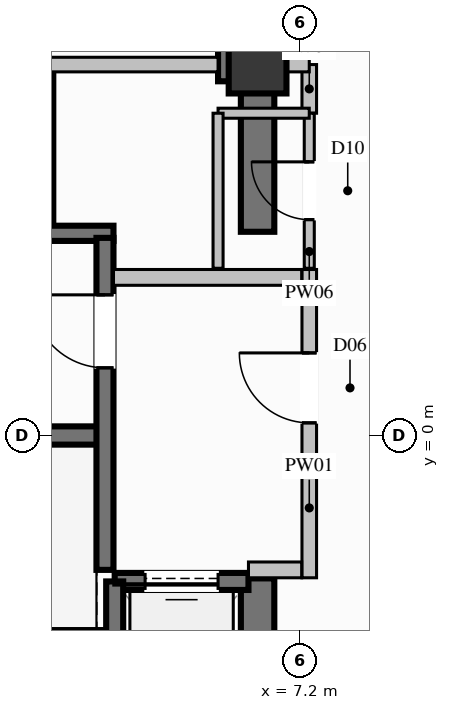
"""IFC4 building model, lengths in metres.
Left out: names, types, materials, properties, quantities, classifications, styles, units other than length and angle.
Written with IfcOpenShell. Run it as: python <this file> out.ifc"""

import sys

from ifc_helpers import new_model, si_unit, direction, frame, frame_2d, origin, origin_2d, place, context, subcontext, project, spatial, rectangle, extrude, element, fill, save


model = new_model("IFC4")
c1 = context("Model", 3, precision=1e-05, world=origin(), true_north=direction((0.0, 1.0)))
c2 = subcontext(c1, "Body", "Model", "MODEL_VIEW")
j1 = project(units=[si_unit("LENGTHUNIT", "METRE"), si_unit("PLANEANGLEUNIT", "RADIAN")], contexts=[c1])
p1 = place(None, origin())
s1 = spatial("IfcSite", under=j1, at=p1, CompositionType="ELEMENT")
p2 = place(p1, origin())
s2 = spatial("IfcBuilding", under=s1, at=p2, CompositionType="ELEMENT")
p3 = place(p2, frame((0.0, 0.0, 168.6)))
s3 = spatial("IfcBuildingStorey", under=s2, at=p3, CompositionType="ELEMENT", Elevation=168.6)
p4 = place(p3, frame((6.5, 6.1, 0.0), z_axis=(0.0, 0.0, 1.0), x_axis=(1.0, 0.0, 0.0)))
e1 = element("IfcColumn", 1, at=p4, inside=s3, PredefinedType="COLUMN", context=c2, shape_type="SweptSolid", body=[
    extrude(rectangle(XDim=0.95, YDim=0.95, at=origin_2d()), origin(), (0.0, 0.0, 1.0), 4.6),
])
p5 = place(p3, frame((-3.99, 0.0, 0.0), z_axis=(0.0, 0.0, 1.0), x_axis=(1.0, 0.0, 0.0)))
e2 = element("IfcWall", 2, at=p5, inside=s3, PredefinedType="SHEAR", context=c2, shape_type="SweptSolid", body=[
    extrude(rectangle(XDim=7.98, YDim=0.3, at=frame_2d((3.99, 0.0))), origin(), (0.0, 0.0, 1.0), 4.6),
])
for number, where, z_axis, x_axis in (
    (3, (-4.13, -3.325, 0.0), (0.0, 0.0, 1.0), (1.0, 0.0, 0.0)),
    (4, (-4.13, 3.325, 0.0), (0.0, 0.0, 1.0), (1.0, 0.0, 0.0)),
):
    element("IfcWall", number, at=place(p3, frame(where, z_axis=z_axis, x_axis=x_axis)), inside=s3, PredefinedType="SOLIDWALL", context=c2, shape_type="SweptSolid", body=[
        extrude(rectangle(XDim=8.26, YDim=0.25, at=frame_2d((4.13, 0.0))), origin(), (0.0, 0.0, 1.0), 4.6),
    ])
p6 = place(p3, frame((5.85, 6.1, 0.0), z_axis=(0.0, 0.0, 1.0), x_axis=(1.0, 0.0, 0.0)))
e5 = element("IfcWall", 5, at=p6, inside=s3, PredefinedType="SHEAR", context=c2, shape_type="SweptSolid", body=[
    extrude(rectangle(XDim=0.375, YDim=0.55, at=frame_2d((0.188, 0.0))), origin(), (0.0, 0.0, 1.0), 4.6),
])
p7 = place(p3, frame((6.5, -6.375, 0.0), z_axis=(0.0, 0.0, 1.0), x_axis=(0.0, 1.0, 0.0)))
e6 = element("IfcWall", 6, at=p7, inside=s3, PredefinedType="SHEAR", context=c2, shape_type="SweptSolid", body=[
    extrude(rectangle(XDim=4.025, YDim=0.55, at=frame_2d((2.012, 0.0))), origin(), (0.0, 0.0, 1.0), 4.6),
])
p8 = place(p3, frame((6.5, 3.35, 0.0), z_axis=(0.0, 0.0, 1.0), x_axis=(0.0, 1.0, 0.0)))
e7 = element("IfcWall", 7, at=p8, inside=s3, PredefinedType="SHEAR", context=c2, shape_type="SweptSolid", body=[
    extrude(rectangle(XDim=3.025, YDim=0.55, at=frame_2d((1.512, 0.0))), origin(), (0.0, 0.0, 1.0), 4.6),
])
p9 = place(p3, frame((3.0, 3.5, 0.0), z_axis=(0.0, 0.0, 1.0), x_axis=(0.0, 1.0, 0.0)))
e8 = element("IfcWall", 8, at=p9, inside=s3, PredefinedType="SOLIDWALL", context=c2, shape_type="SweptSolid", body=[
    extrude(rectangle(XDim=2.5, YDim=0.28, at=frame_2d((1.25, 0.0))), origin(), (0.0, 0.0, 1.0), 4.36),
])
p10 = place(p3, frame((6.35, -2.4, 0.0), z_axis=(0.0, 0.0, 1.0), x_axis=(-1.0, 0.0, 0.0)))
e9 = element("IfcWall", 9, at=p10, inside=s3, PredefinedType="SOLIDWALL", context=c2, shape_type="SweptSolid", body=[
    extrude(rectangle(XDim=2.2, YDim=0.28, at=frame_2d((1.1, 0.0))), origin(), (0.0, 0.0, 1.0), 4.36),
])
p11 = place(p10, frame((0.5, 0.0, 0.0)))
e10 = element("IfcOpeningElement", 10, at=p11, cuts=e9, PredefinedType="OPENING", context=c2, shape_type="SweptSolid", body=[
    extrude(rectangle(XDim=1.2, YDim=2.2, at=frame_2d((0.6, 1.1))), frame((0.0, 0.15, 0.0), z_axis=(0.0, -1.0, 0.0), x_axis=(1.0, 0.0, 0.0)), (0.0, 0.0, 1.0), 0.3),
])
p12 = place(p3, frame((4.15, -2.4, 0.0), z_axis=(0.0, 0.0, 1.0), x_axis=(0.0, -1.0, 0.0)))
e11 = element("IfcWall", 11, at=p12, inside=s3, PredefinedType="SOLIDWALL", context=c2, shape_type="SweptSolid", body=[
    extrude(rectangle(XDim=2.7, YDim=0.28, at=frame_2d((1.35, 0.0))), origin(), (0.0, 0.0, 1.0), 4.36),
])
p13 = place(p3, frame((3.99, -2.21, 0.0), z_axis=(0.0, 0.0, 1.0), x_axis=(0.0, 1.0, 0.0)))
e12 = element("IfcWall", 12, at=p13, inside=s3, PredefinedType="SOLIDWALL", context=c2, shape_type="SweptSolid", body=[
    extrude(rectangle(XDim=5.46, YDim=0.28, at=frame_2d((2.73, 0.0))), origin(), (0.0, 0.0, 1.0), 4.36),
])
p14 = place(p13, frame((3.323, 0.0, 0.0)))
e13 = element("IfcOpeningElement", 13, at=p14, cuts=e12, PredefinedType="OPENING", context=c2, shape_type="SweptSolid", body=[
    extrude(rectangle(XDim=1.2, YDim=2.2, at=frame_2d((0.6, 1.1))), frame((0.0, 0.15, 0.0), z_axis=(0.0, -1.0, 0.0), x_axis=(1.0, 0.0, 0.0)), (0.0, 0.0, 1.0), 0.3),
])
p15 = place(p3, frame((7.35, -2.34, 0.0), z_axis=(0.0, 0.0, 1.0), x_axis=(0.0, 1.0, 0.0)))
e14 = element("IfcWall", 14, at=p15, inside=s3, PredefinedType="PARTITIONING", context=c2, shape_type="SweptSolid", body=[
    extrude(rectangle(XDim=5.07, YDim=0.24, at=frame_2d((2.535, 0.0))), origin(), (0.0, 0.0, 1.0), 3.245),
])
p16 = place(p15, frame((2.548, 0.0, 0.0)))
e15 = element("IfcOpeningElement", 15, at=p16, cuts=e14, PredefinedType="OPENING", context=c2, shape_type="SweptSolid", body=[
    extrude(rectangle(XDim=1.15, YDim=2.2, at=frame_2d((0.575, 1.1))), frame((0.0, 0.13, 0.0), z_axis=(0.0, -1.0, 0.0), x_axis=(1.0, 0.0, 0.0)), (0.0, 0.0, 1.0), 0.26),
])
p17 = place(p3, frame((6.35, -2.21, 0.0), z_axis=(0.0, 0.0, 1.0), x_axis=(1.0, 0.0, 0.0)))
e16 = element("IfcWall", 16, at=p17, inside=s3, PredefinedType="PARTITIONING", context=c2, shape_type="SweptSolid", body=[
    extrude(rectangle(XDim=0.875, YDim=0.26, at=frame_2d((0.438, 0.0))), origin(), (0.0, 0.0, 1.0), 4.36),
])
p18 = place(p3, frame((4.13, 2.6, 0.0), z_axis=(0.0, 0.0, 1.0), x_axis=(1.0, 0.0, 0.0)))
e17 = element("IfcWall", 17, at=p18, inside=s3, PredefinedType="PARTITIONING", context=c2, shape_type="SweptSolid", body=[
    extrude(rectangle(XDim=3.095, YDim=0.26, at=frame_2d((1.548, 0.0))), origin(), (0.0, 0.0, 1.0), 4.36),
])
p19 = place(p3, frame((3.0, 6.1, 0.0), z_axis=(0.0, 0.0, 1.0), x_axis=(1.0, 0.0, 0.0)))
e18 = element("IfcWall", 18, at=p19, inside=s3, PredefinedType="PARTITIONING", context=c2, shape_type="SweptSolid", body=[
    extrude(rectangle(XDim=2.85, YDim=0.24, at=frame_2d((1.425, 0.0))), origin(), (0.0, 0.0, 1.0), 3.245),
])
p20 = place(p3, frame((7.35, 5.3, 0.0), z_axis=(0.0, 0.0, 1.0), x_axis=(0.0, 1.0, 0.0)))
e19 = element("IfcWall", 19, at=p20, inside=s3, PredefinedType="PARTITIONING", context=c2, shape_type="SweptSolid", body=[
    extrude(rectangle(XDim=0.8, YDim=0.24, at=frame_2d((0.4, 0.0))), origin(), (0.0, 0.0, 1.0), 3.245),
])
p21 = place(p3, frame((6.5, 6.1, 0.0), z_axis=(0.0, 0.0, 1.0), x_axis=(1.0, 0.0, 0.0)))
e20 = element("IfcWall", 20, at=p21, inside=s3, PredefinedType="PARTITIONING", context=c2, shape_type="SweptSolid", body=[
    extrude(rectangle(XDim=0.85, YDim=0.24, at=frame_2d((0.425, 0.0))), origin(), (0.0, 0.0, 1.0), 3.877),
])
p22 = place(p3, frame((7.35, 2.75, 0.0), z_axis=(0.0, 0.0, 1.0), x_axis=(0.0, 1.0, 0.0)))
e21 = element("IfcWall", 21, at=p22, inside=s3, PredefinedType="PARTITIONING", context=c2, shape_type="SweptSolid", body=[
    extrude(rectangle(XDim=2.55, YDim=0.165, at=frame_2d((1.275, 0.0))), origin(), (0.0, 0.0, 1.0), 3.245),
])
p23 = place(p22, frame((0.8, 0.0, 0.0)))
e22 = element("IfcOpeningElement", 22, at=p23, cuts=e21, PredefinedType="OPENING", context=c2, shape_type="SweptSolid", body=[
    extrude(rectangle(XDim=0.95, YDim=2.1, at=frame_2d((0.475, 1.05))), frame((0.0, 0.093, 0.0), z_axis=(0.0, -1.0, 0.0), x_axis=(1.0, 0.0, 0.0)), (0.0, 0.0, 1.0), 0.185),
])
p24 = place(p3, frame((7.35, 5.3, 0.0), z_axis=(0.0, 0.0, 1.0), x_axis=(-1.0, 0.0, 0.0)))
e23 = element("IfcWall", 23, at=p24, inside=s3, PredefinedType="PARTITIONING", context=c2, shape_type="SweptSolid", body=[
    extrude(rectangle(XDim=1.5, YDim=0.165, at=frame_2d((0.75, 0.0))), origin(), (0.0, 0.0, 1.0), 3.245),
])
p25 = place(p3, frame((5.85, 5.3, 0.0), z_axis=(0.0, 0.0, 1.0), x_axis=(0.0, -1.0, 0.0)))
e24 = element("IfcWall", 24, at=p25, inside=s3, PredefinedType="PARTITIONING", context=c2, shape_type="SweptSolid", body=[
    extrude(rectangle(XDim=2.55, YDim=0.165, at=frame_2d((1.275, 0.0))), origin(), (0.0, 0.0, 1.0), 3.245),
])
p26 = place(p3, frame((7.35, 8.65, 0.0), z_axis=(0.0, 0.0, 1.0), x_axis=(0.851645088617, -0.524118920699, 0.0)))
e25 = element("IfcWall", 25, at=p26, inside=s3, PredefinedType="PARTITIONING", context=c2, shape_type="SweptSolid", body=[
    extrude(rectangle(XDim=4.436, YDim=0.19, at=frame_2d((2.218, 0.0))), origin(), (0.0, 0.0, 1.0), 4.36),
])
p27 = place(p26, frame((1.318, 0.0, 0.0)))
e26 = element("IfcOpeningElement", 26, at=p27, cuts=e25, PredefinedType="OPENING", context=c2, shape_type="SweptSolid", body=[
    extrude(rectangle(XDim=1.8, YDim=2.4, at=frame_2d((0.9, 1.2))), frame((0.0, 0.105, 0.0), z_axis=(0.0, -1.0, 0.0), x_axis=(1.0, 0.0, 0.0)), (0.0, 0.0, 1.0), 0.21),
])
p28 = place(p11, origin())
e27 = element("IfcDoor", 27, at=p28, inside=s3, OperationType="SLIDING_TO_LEFT", PredefinedType="DOOR", context=c2, shape_type="SweptSolid", body=[
    extrude(rectangle(XDim=1.2, YDim=2.2, at=frame_2d((0.6, 1.1))), frame((0.0, 0.025, 0.0), z_axis=(0.0, -1.0, 0.0), x_axis=(1.0, 0.0, 0.0)), (0.0, 0.0, 1.0), 0.05),
])
fill(e10, e27)
p29 = place(p14, origin())
e28 = element("IfcDoor", 28, at=p29, inside=s3, OperationType="SINGLE_SWING_RIGHT", PredefinedType="DOOR", context=c2, shape_type="SweptSolid", body=[
    extrude(rectangle(XDim=1.2, YDim=2.2, at=frame_2d((0.6, 1.1))), frame((0.0, 0.025, 0.0), z_axis=(0.0, -1.0, 0.0), x_axis=(1.0, 0.0, 0.0)), (0.0, 0.0, 1.0), 0.05),
])
fill(e13, e28)
p30 = place(p16, origin())
e29 = element("IfcDoor", 29, at=p30, inside=s3, OperationType="SINGLE_SWING_RIGHT", PredefinedType="DOOR", context=c2, shape_type="SweptSolid", body=[
    extrude(rectangle(XDim=1.15, YDim=2.2, at=frame_2d((0.575, 1.1))), frame((0.0, 0.025, 0.0), z_axis=(0.0, -1.0, 0.0), x_axis=(1.0, 0.0, 0.0)), (0.0, 0.0, 1.0), 0.05),
])
fill(e15, e29)
p31 = place(p23, origin())
e30 = element("IfcDoor", 30, at=p31, inside=s3, OperationType="SINGLE_SWING_RIGHT", PredefinedType="DOOR", context=c2, shape_type="SweptSolid", body=[
    extrude(rectangle(XDim=0.95, YDim=2.1, at=frame_2d((0.475, 1.05))), frame((0.0, 0.025, 0.0), z_axis=(0.0, -1.0, 0.0), x_axis=(1.0, 0.0, 0.0)), (0.0, 0.0, 1.0), 0.05),
])
fill(e22, e30)
save(model, sys.argv[1])
